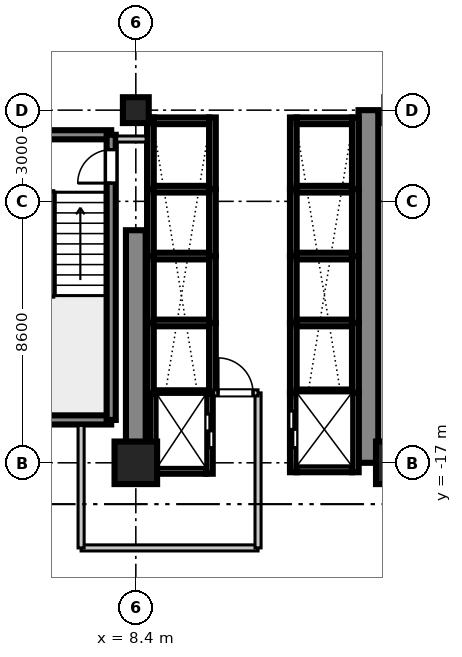
"""IFC4 building model, lengths in metres.
Left out: names, types, materials, properties, quantities, classifications, styles, units other than length and angle.
Written with IfcOpenShell. Run it as: python <this file> out.ifc"""

import sys

from ifc_helpers import new_model, si_unit, direction, frame, frame_2d, origin, origin_2d, place, context, subcontext, project, spatial, rectangle, extrude, source, transform, mapped, element, fill, save


model = new_model("IFC4")
c1 = context("Model", 3, precision=1e-05, world=origin(), true_north=direction((0.0, 1.0)))
c2 = subcontext(c1, "Body", "Model", "MODEL_VIEW")
j1 = project(units=[si_unit("LENGTHUNIT", "METRE"), si_unit("PLANEANGLEUNIT", "RADIAN")], contexts=[c1])
p1 = place(None, origin())
s1 = spatial("IfcSite", under=j1, at=p1, CompositionType="ELEMENT")
p2 = place(p1, origin())
s2 = spatial("IfcBuilding", under=s1, at=p2, CompositionType="ELEMENT")
p3 = place(p2, frame((0.0, 0.0, 39.7)))
s3 = spatial("IfcBuildingStorey", under=s2, at=p3, CompositionType="ELEMENT", Elevation=39.7)
m1 = source(origin(), c2, "Body", "SweptSolid", [
    extrude(rectangle(XDim=1.4, YDim=1.4, at=origin_2d()), origin(), (0.0, 0.0, 1.0), 3.605),
])
p4 = place(p3, frame((8.4, -17.0, 0.0), z_axis=(0.0, 0.0, 1.0), x_axis=(1.0, 0.0, 0.0)))
e1 = element("IfcColumn", 1, at=p4, inside=s3, PredefinedType="COLUMN", context=c2, shape_type="MappedRepresentation", body=[
    mapped(m1, transform((0.0, 0.0, 0.0), scale=1.0)),
])
m2 = source(origin(), c2, "Body", "SweptSolid", [
    extrude(rectangle(XDim=0.85, YDim=0.85, at=origin_2d()), origin(), (0.0, 0.0, 1.0), 3.605),
])
p5 = place(p3, frame((8.4, -5.4, 0.0), z_axis=(0.0, 0.0, 1.0), x_axis=(1.0, 0.0, 0.0)))
e2 = element("IfcColumn", 2, at=p5, inside=s3, PredefinedType="PILASTER", context=c2, shape_type="MappedRepresentation", body=[
    mapped(m2, transform((0.0, 0.0, 0.0), scale=1.0)),
])
p6 = place(p3, frame((17.0, -17.0, 0.0), z_axis=(0.0, 0.0, 1.0), x_axis=(1.0, 0.0, 0.0)))
e3 = element("IfcColumn", 3, at=p6, inside=s3, PredefinedType="COLUMN", context=c2, shape_type="MappedRepresentation", body=[
    mapped(m1, transform((0.0, 0.0, 0.0), scale=1.0)),
])
m3 = source(origin(), c2, "Body", "SweptSolid", [
    extrude(rectangle(XDim=7.65, YDim=0.65, at=frame_2d((3.825, 0.0))), origin(), (0.0, 0.0, 1.0), 3.37),
])
p7 = place(p3, frame((8.4, -17.0, 0.0), z_axis=(0.0, 0.0, 1.0), x_axis=(0.0, 1.0, 0.0)))
e4 = element("IfcWall", 4, at=p7, inside=s3, PredefinedType="SHEAR", context=c2, shape_type="MappedRepresentation", body=[
    mapped(m3, transform((0.0, 0.0, 0.0), scale=1.0)),
])
m4 = source(origin(), c2, "Body", "SweptSolid", [
    extrude(rectangle(XDim=11.6, YDim=0.65, at=frame_2d((5.8, 0.0))), origin(), (0.0, 0.0, 1.0), 3.37),
])
p8 = place(p3, frame((16.05, -17.0, 0.0), z_axis=(0.0, 0.0, 1.0), x_axis=(0.0, 1.0, 0.0)))
e5 = element("IfcWall", 5, at=p8, inside=s3, PredefinedType="SHEAR", context=c2, shape_type="MappedRepresentation", body=[
    mapped(m4, transform((0.0, 0.0, 0.0), scale=1.0)),
])
m5 = source(origin(), c2, "Body", "SweptSolid", [
    extrude(rectangle(XDim=3.98, YDim=0.3, at=frame_2d((1.99, 0.0))), origin(), (0.0, 0.0, 1.0), 3.37),
])
for number, where, z_axis, x_axis in (
    (6, (3.61, -15.59, 0.0), (0.0, 0.0, 1.0), (1.0, 0.0, 0.0)),
    (7, (3.61, -6.21, 0.0), (0.0, 0.0, 1.0), (1.0, 0.0, 0.0)),
):
    element("IfcWall", number, at=place(p3, frame(where, z_axis=z_axis, x_axis=x_axis)), inside=s3, PredefinedType="SHEAR", context=c2, shape_type="MappedRepresentation", body=[
        mapped(m5, transform((0.0, 0.0, 0.0), scale=1.0)),
    ])
m6 = source(origin(), c2, "Body", "SweptSolid", [
    extrude(rectangle(XDim=9.38, YDim=0.3, at=frame_2d((4.69, 0.0))), origin(), (0.0, 0.0, 1.0), 3.37),
])
p9 = place(p3, frame((7.59, -15.59, 0.0), z_axis=(0.0, 0.0, 1.0), x_axis=(0.0, 1.0, 0.0)))
e8 = element("IfcWall", 8, at=p9, inside=s3, PredefinedType="SHEAR", context=c2, shape_type="MappedRepresentation", body=[
    mapped(m6, transform((0.0, 0.0, 0.0), scale=1.0)),
])
p10 = place(p9, frame((7.79, 0.0, 0.0)))
e9 = element("IfcOpeningElement", 9, at=p10, cuts=e8, PredefinedType="OPENING", context=c2, shape_type="SweptSolid", body=[
    extrude(rectangle(XDim=1.1, YDim=2.15, at=frame_2d((0.55, 1.075))), frame((0.0, 0.16, 0.0), z_axis=(0.0, -1.0, 0.0), x_axis=(1.0, 0.0, 0.0)), (0.0, 0.0, 1.0), 0.32),
])
m7 = source(origin(), c2, "Body", "SweptSolid", [
    extrude(rectangle(XDim=2.36, YDim=0.22, at=frame_2d((1.18, 0.0))), origin(), (0.0, 0.0, 1.0), 3.37),
])
for number, where, z_axis, x_axis in (
    (10, (13.58, -8.0, 0.0), (0.0, 0.0, 1.0), (0.0, 1.0, 0.0)),
    (11, (15.62, -8.0, 0.0), (0.0, 0.0, 1.0), (0.0, 1.0, 0.0)),
):
    element("IfcWall", number, at=place(p3, frame(where, z_axis=z_axis, x_axis=x_axis)), inside=s3, PredefinedType="SHEAR", context=c2, shape_type="MappedRepresentation", body=[
        mapped(m7, transform((0.0, 0.0, 0.0), scale=1.0)),
    ])
m8 = source(origin(), c2, "Body", "SweptSolid", [
    extrude(rectangle(XDim=1.82, YDim=0.22, at=frame_2d((0.91, 0.0))), origin(), (0.0, 0.0, 1.0), 3.37),
])
p11 = place(p3, frame((13.69, -5.75, 0.0), z_axis=(0.0, 0.0, 1.0), x_axis=(1.0, 0.0, 0.0)))
e12 = element("IfcWall", 12, at=p11, inside=s3, PredefinedType="SHEAR", context=c2, shape_type="MappedRepresentation", body=[
    mapped(m8, transform((0.0, 0.0, 0.0), scale=1.0)),
])
m9 = source(origin(), c2, "Body", "SweptSolid", [
    extrude(rectangle(XDim=2.2, YDim=0.22, at=frame_2d((1.1, 0.0))), origin(), (0.0, 0.0, 1.0), 3.37),
])
for number, where, z_axis, x_axis in (
    (13, (13.58, -10.2, 0.0), (0.0, 0.0, 1.0), (0.0, 1.0, 0.0)),
    (14, (15.62, -10.2, 0.0), (0.0, 0.0, 1.0), (0.0, 1.0, 0.0)),
):
    element("IfcWall", number, at=place(p3, frame(where, z_axis=z_axis, x_axis=x_axis)), inside=s3, PredefinedType="SHEAR", context=c2, shape_type="MappedRepresentation", body=[
        mapped(m9, transform((0.0, 0.0, 0.0), scale=1.0)),
    ])
m10 = source(origin(), c2, "Body", "SweptSolid", [
    extrude(rectangle(XDim=1.82, YDim=0.22, at=frame_2d((0.91, 0.0))), origin(), (0.0, 0.0, 1.0), 3.65),
])
p12 = place(p3, frame((13.69, -8.0, 0.0), z_axis=(0.0, 0.0, 1.0), x_axis=(1.0, 0.0, 0.0)))
e15 = element("IfcWall", 15, at=p12, inside=s3, PredefinedType="SHEAR", context=c2, shape_type="MappedRepresentation", body=[
    mapped(m10, transform((0.0, 0.0, 0.0), scale=1.0)),
])
for number, where, z_axis, x_axis in (
    (16, (13.58, -12.4, 0.0), (0.0, 0.0, 1.0), (0.0, 1.0, 0.0)),
    (17, (15.62, -12.4, 0.0), (0.0, 0.0, 1.0), (0.0, 1.0, 0.0)),
):
    element("IfcWall", number, at=place(p3, frame(where, z_axis=z_axis, x_axis=x_axis)), inside=s3, PredefinedType="SHEAR", context=c2, shape_type="MappedRepresentation", body=[
        mapped(m9, transform((0.0, 0.0, 0.0), scale=1.0)),
    ])
p13 = place(p3, frame((13.69, -10.2, 0.0), z_axis=(0.0, 0.0, 1.0), x_axis=(1.0, 0.0, 0.0)))
e18 = element("IfcWall", 18, at=p13, inside=s3, PredefinedType="SHEAR", context=c2, shape_type="MappedRepresentation", body=[
    mapped(m10, transform((0.0, 0.0, 0.0), scale=1.0)),
])
m11 = source(origin(), c2, "Body", "SweptSolid", [
    extrude(rectangle(XDim=2.3, YDim=0.22, at=frame_2d((1.15, 0.0))), origin(), (0.0, 0.0, 1.0), 3.37),
])
for number, where, z_axis, x_axis in (
    (19, (13.58, -14.7, 0.0), (0.0, 0.0, 1.0), (0.0, 1.0, 0.0)),
    (20, (15.62, -14.7, 0.0), (0.0, 0.0, 1.0), (0.0, 1.0, 0.0)),
):
    element("IfcWall", number, at=place(p3, frame(where, z_axis=z_axis, x_axis=x_axis)), inside=s3, PredefinedType="SHEAR", context=c2, shape_type="MappedRepresentation", body=[
        mapped(m11, transform((0.0, 0.0, 0.0), scale=1.0)),
    ])
p14 = place(p3, frame((13.69, -12.4, 0.0), z_axis=(0.0, 0.0, 1.0), x_axis=(1.0, 0.0, 0.0)))
e21 = element("IfcWall", 21, at=p14, inside=s3, PredefinedType="SHEAR", context=c2, shape_type="MappedRepresentation", body=[
    mapped(m10, transform((0.0, 0.0, 0.0), scale=1.0)),
])
for number, where, z_axis, x_axis in (
    (22, (8.88, -8.0, 0.0), (0.0, 0.0, 1.0), (0.0, 1.0, 0.0)),
    (23, (10.92, -8.0, 0.0), (0.0, 0.0, 1.0), (0.0, 1.0, 0.0)),
):
    element("IfcWall", number, at=place(p3, frame(where, z_axis=z_axis, x_axis=x_axis)), inside=s3, PredefinedType="SHEAR", context=c2, shape_type="MappedRepresentation", body=[
        mapped(m7, transform((0.0, 0.0, 0.0), scale=1.0)),
    ])
p15 = place(p3, frame((8.99, -5.75, 0.0), z_axis=(0.0, 0.0, 1.0), x_axis=(1.0, 0.0, 0.0)))
e24 = element("IfcWall", 24, at=p15, inside=s3, PredefinedType="SHEAR", context=c2, shape_type="MappedRepresentation", body=[
    mapped(m8, transform((0.0, 0.0, 0.0), scale=1.0)),
])
for number, where, z_axis, x_axis in (
    (25, (8.88, -10.2, 0.0), (0.0, 0.0, 1.0), (0.0, 1.0, 0.0)),
    (26, (10.92, -10.2, 0.0), (0.0, 0.0, 1.0), (0.0, 1.0, 0.0)),
):
    element("IfcWall", number, at=place(p3, frame(where, z_axis=z_axis, x_axis=x_axis)), inside=s3, PredefinedType="SHEAR", context=c2, shape_type="MappedRepresentation", body=[
        mapped(m9, transform((0.0, 0.0, 0.0), scale=1.0)),
    ])
p16 = place(p3, frame((8.99, -8.0, 0.0), z_axis=(0.0, 0.0, 1.0), x_axis=(1.0, 0.0, 0.0)))
e27 = element("IfcWall", 27, at=p16, inside=s3, PredefinedType="SHEAR", context=c2, shape_type="MappedRepresentation", body=[
    mapped(m10, transform((0.0, 0.0, 0.0), scale=1.0)),
])
for number, where, z_axis, x_axis in (
    (28, (8.88, -12.4, 0.0), (0.0, 0.0, 1.0), (0.0, 1.0, 0.0)),
    (29, (10.92, -12.4, 0.0), (0.0, 0.0, 1.0), (0.0, 1.0, 0.0)),
):
    element("IfcWall", number, at=place(p3, frame(where, z_axis=z_axis, x_axis=x_axis)), inside=s3, PredefinedType="SHEAR", context=c2, shape_type="MappedRepresentation", body=[
        mapped(m9, transform((0.0, 0.0, 0.0), scale=1.0)),
    ])
p17 = place(p3, frame((8.99, -10.2, 0.0), z_axis=(0.0, 0.0, 1.0), x_axis=(1.0, 0.0, 0.0)))
e30 = element("IfcWall", 30, at=p17, inside=s3, PredefinedType="SHEAR", context=c2, shape_type="MappedRepresentation", body=[
    mapped(m10, transform((0.0, 0.0, 0.0), scale=1.0)),
])
m12 = source(origin(), c2, "Body", "SweptSolid", [
    extrude(rectangle(XDim=2.325, YDim=0.22, at=frame_2d((1.163, 0.0))), origin(), (0.0, 0.0, 1.0), 3.37),
])
for number, where, z_axis, x_axis in (
    (31, (8.88, -14.725, 0.0), (0.0, 0.0, 1.0), (0.0, 1.0, 0.0)),
    (32, (10.92, -14.725, 0.0), (0.0, 0.0, 1.0), (0.0, 1.0, 0.0)),
):
    element("IfcWall", number, at=place(p3, frame(where, z_axis=z_axis, x_axis=x_axis)), inside=s3, PredefinedType="SHEAR", context=c2, shape_type="MappedRepresentation", body=[
        mapped(m12, transform((0.0, 0.0, 0.0), scale=1.0)),
    ])
p18 = place(p3, frame((8.99, -12.4, 0.0), z_axis=(0.0, 0.0, 1.0), x_axis=(1.0, 0.0, 0.0)))
e33 = element("IfcWall", 33, at=p18, inside=s3, PredefinedType="SHEAR", context=c2, shape_type="MappedRepresentation", body=[
    mapped(m10, transform((0.0, 0.0, 0.0), scale=1.0)),
])
m13 = source(origin(), c2, "Body", "SweptSolid", [
    extrude(rectangle(XDim=2.635, YDim=0.22, at=frame_2d((1.317, 0.0))), origin(), (0.0, 0.0, 1.0), 3.37),
])
p19 = place(p3, frame((8.98, -17.36, 0.0), z_axis=(0.0, 0.0, 1.0), x_axis=(0.0, 1.0, 0.0)))
e34 = element("IfcWall", 34, at=p19, inside=s3, PredefinedType="SHEAR", context=c2, shape_type="MappedRepresentation", body=[
    mapped(m13, transform((0.0, 0.0, 0.0), scale=1.0)),
])
p20 = place(p3, frame((10.82, -17.36, 0.0), z_axis=(0.0, 0.0, 1.0), x_axis=(0.0, 1.0, 0.0)))
e35 = element("IfcWall", 35, at=p20, inside=s3, PredefinedType="SHEAR", context=c2, shape_type="MappedRepresentation", body=[
    mapped(m13, transform((0.0, 0.0, 0.0), scale=1.0)),
])
p21 = place(p20, frame((0.86, 0.0, 0.0)))
e36 = element("IfcOpeningElement", 36, at=p21, cuts=e35, PredefinedType="OPENING", context=c2, shape_type="SweptSolid", body=[
    extrude(rectangle(XDim=1.1, YDim=2.2, at=frame_2d((0.55, 1.1))), frame((0.0, 0.12, 0.0), z_axis=(0.0, -1.0, 0.0), x_axis=(1.0, 0.0, 0.0)), (0.0, 0.0, 1.0), 0.24),
])
m14 = source(origin(), c2, "Body", "SweptSolid", [
    extrude(rectangle(XDim=1.62, YDim=0.22, at=frame_2d((0.81, 0.0))), origin(), (0.0, 0.0, 1.0), 3.37),
])
p22 = place(p3, frame((9.09, -17.25, 0.0), z_axis=(0.0, 0.0, 1.0), x_axis=(1.0, 0.0, 0.0)))
e37 = element("IfcWall", 37, at=p22, inside=s3, PredefinedType="SHEAR", context=c2, shape_type="MappedRepresentation", body=[
    mapped(m14, transform((0.0, 0.0, 0.0), scale=1.0)),
])
m15 = source(origin(), c2, "Body", "SweptSolid", [
    extrude(rectangle(XDim=1.62, YDim=0.22, at=frame_2d((0.81, 0.0))), origin(), (0.0, 0.0, 1.0), 3.65),
])
p23 = place(p3, frame((9.09, -14.725, 0.0), z_axis=(0.0, 0.0, 1.0), x_axis=(1.0, 0.0, 0.0)))
e38 = element("IfcWall", 38, at=p23, inside=s3, PredefinedType="SHEAR", context=c2, shape_type="MappedRepresentation", body=[
    mapped(m15, transform((0.0, 0.0, 0.0), scale=1.0)),
])
m16 = source(origin(), c2, "Body", "SweptSolid", [
    extrude(rectangle(XDim=2.61, YDim=0.22, at=frame_2d((1.305, 0.0))), origin(), (0.0, 0.0, 1.0), 3.37),
])
p24 = place(p3, frame((13.58, -17.31, 0.0), z_axis=(0.0, 0.0, 1.0), x_axis=(0.0, 1.0, 0.0)))
e39 = element("IfcWall", 39, at=p24, inside=s3, PredefinedType="SHEAR", context=c2, shape_type="MappedRepresentation", body=[
    mapped(m16, transform((0.0, 0.0, 0.0), scale=1.0)),
])
p25 = place(p24, frame((0.81, 0.0, 0.0)))
e40 = element("IfcOpeningElement", 40, at=p25, cuts=e39, PredefinedType="OPENING", context=c2, shape_type="SweptSolid", body=[
    extrude(rectangle(XDim=1.2, YDim=2.2, at=frame_2d((0.6, 1.1))), frame((0.0, 0.12, 0.0), z_axis=(0.0, -1.0, 0.0), x_axis=(1.0, 0.0, 0.0)), (0.0, 0.0, 1.0), 0.24),
])
p26 = place(p3, frame((15.62, -17.31, 0.0), z_axis=(0.0, 0.0, 1.0), x_axis=(0.0, 1.0, 0.0)))
e41 = element("IfcWall", 41, at=p26, inside=s3, PredefinedType="SHEAR", context=c2, shape_type="MappedRepresentation", body=[
    mapped(m16, transform((0.0, 0.0, 0.0), scale=1.0)),
])
p27 = place(p3, frame((13.69, -17.2, 0.0), z_axis=(0.0, 0.0, 1.0), x_axis=(1.0, 0.0, 0.0)))
e42 = element("IfcWall", 42, at=p27, inside=s3, PredefinedType="SHEAR", context=c2, shape_type="MappedRepresentation", body=[
    mapped(m8, transform((0.0, 0.0, 0.0), scale=1.0)),
])
p28 = place(p3, frame((13.69, -14.7, 0.0), z_axis=(0.0, 0.0, 1.0), x_axis=(1.0, 0.0, 0.0)))
e43 = element("IfcWall", 43, at=p28, inside=s3, PredefinedType="SHEAR", context=c2, shape_type="MappedRepresentation", body=[
    mapped(m10, transform((0.0, 0.0, 0.0), scale=1.0)),
])
m17 = source(origin(), c2, "Body", "SweptSolid", [
    extrude(rectangle(XDim=5.82, YDim=0.2, at=frame_2d((2.91, 0.0))), origin(), (0.0, 0.0, 1.0), 2.71),
])
p29 = place(p3, frame((6.6, -19.8, 0.0), z_axis=(0.0, 0.0, 1.0), x_axis=(1.0, 0.0, 0.0)))
e44 = element("IfcWall", 44, at=p29, inside=s3, PredefinedType="PARTITIONING", context=c2, shape_type="MappedRepresentation", body=[
    mapped(m17, transform((0.0, 0.0, 0.0), scale=1.0)),
])
m18 = source(origin(), c2, "Body", "SweptSolid", [
    extrude(rectangle(XDim=4.03, YDim=0.2, at=frame_2d((2.015, 0.0))), origin(), (0.0, 0.0, 1.0), 2.71),
])
p30 = place(p3, frame((6.6, -19.8, 0.0), z_axis=(0.0, 0.0, 1.0), x_axis=(0.0, 1.0, 0.0)))
e45 = element("IfcWall", 45, at=p30, inside=s3, PredefinedType="PARTITIONING", context=c2, shape_type="MappedRepresentation", body=[
    mapped(m18, transform((0.0, 0.0, 0.0), scale=1.0)),
])
m19 = source(origin(), c2, "Body", "SweptSolid", [
    extrude(rectangle(XDim=5.1, YDim=0.2, at=frame_2d((2.55, 0.0))), origin(), (0.0, 0.0, 1.0), 2.71),
])
p31 = place(p3, frame((12.42, -19.8, 0.0), z_axis=(0.0, 0.0, 1.0), x_axis=(0.0, 1.0, 0.0)))
e46 = element("IfcWall", 46, at=p31, inside=s3, PredefinedType="PARTITIONING", context=c2, shape_type="MappedRepresentation", body=[
    mapped(m19, transform((0.0, 0.0, 0.0), scale=1.0)),
])
m20 = source(origin(), c2, "Body", "SweptSolid", [
    extrude(rectangle(XDim=1.46, YDim=0.2, at=frame_2d((0.73, 0.0))), origin(), (0.0, 0.0, 1.0), 2.71),
])
p32 = place(p3, frame((10.96, -14.7, 0.0), z_axis=(0.0, 0.0, 1.0), x_axis=(1.0, 0.0, 0.0)))
e47 = element("IfcWall", 47, at=p32, inside=s3, PredefinedType="PARTITIONING", context=c2, shape_type="MappedRepresentation", body=[
    mapped(m20, transform((0.0, 0.0, 0.0), scale=1.0)),
])
p33 = place(p32, frame((0.145, 0.0, 0.0)))
e48 = element("IfcOpeningElement", 48, at=p33, cuts=e47, PredefinedType="OPENING", context=c2, shape_type="SweptSolid", body=[
    extrude(rectangle(XDim=1.15, YDim=2.15, at=frame_2d((0.575, 1.075))), frame((0.0, 0.11, 0.0), z_axis=(0.0, -1.0, 0.0), x_axis=(1.0, 0.0, 0.0)), (0.0, 0.0, 1.0), 0.22),
])
m21 = source(origin(), c2, "Body", "SweptSolid", [
    extrude(rectangle(XDim=0.97, YDim=0.2, at=frame_2d((0.485, 0.0))), origin(), (0.0, 0.0, 1.0), 2.71),
])
p34 = place(p3, frame((7.77, -6.35, 0.0), z_axis=(0.0, 0.0, 1.0), x_axis=(1.0, 0.0, 0.0)))
e49 = element("IfcWall", 49, at=p34, inside=s3, PredefinedType="PARTITIONING", context=c2, shape_type="MappedRepresentation", body=[
    mapped(m21, transform((0.0, 0.0, 0.0), scale=1.0)),
])
m22 = source(origin(), c2, "Body", "SweptSolid", [
    extrude(rectangle(XDim=1.1, YDim=2.15, at=frame_2d((0.55, 1.075))), frame((0.0, 0.025, 0.0), z_axis=(0.0, -1.0, 0.0), x_axis=(1.0, 0.0, 0.0)), (0.0, 0.0, 1.0), 0.05),
])
p35 = place(p10, origin())
e50 = element("IfcDoor", 50, at=p35, inside=s3, OperationType="SINGLE_SWING_LEFT", PredefinedType="DOOR", context=c2, shape_type="MappedRepresentation", body=[
    mapped(m22, transform((0.0, 0.0, 0.0), scale=1.0)),
])
fill(e9, e50)
m23 = source(origin(), c2, "Body", "SweptSolid", [
    extrude(rectangle(XDim=1.1, YDim=2.2, at=frame_2d((0.55, 1.1))), frame((0.0, 0.025, 0.0), z_axis=(0.0, -1.0, 0.0), x_axis=(1.0, 0.0, 0.0)), (0.0, 0.0, 1.0), 0.05),
])
p36 = place(p21, frame((1.1, 0.0, 0.0), z_axis=(0.0, 0.0, 1.0), x_axis=(-1.0, 0.0, 0.0)))
e51 = element("IfcDoor", 51, at=p36, inside=s3, OperationType="DOUBLE_DOOR_SLIDING", PredefinedType="DOOR", context=c2, shape_type="MappedRepresentation", body=[
    mapped(m23, transform((0.0, 0.0, 0.0), scale=1.0)),
])
fill(e36, e51)
m24 = source(origin(), c2, "Body", "SweptSolid", [
    extrude(rectangle(XDim=1.2, YDim=2.2, at=frame_2d((0.6, 1.1))), frame((0.0, 0.025, 0.0), z_axis=(0.0, -1.0, 0.0), x_axis=(1.0, 0.0, 0.0)), (0.0, 0.0, 1.0), 0.05),
])
p37 = place(p25, origin())
e52 = element("IfcDoor", 52, at=p37, inside=s3, OperationType="DOUBLE_DOOR_SLIDING", PredefinedType="DOOR", context=c2, shape_type="MappedRepresentation", body=[
    mapped(m24, transform((0.0, 0.0, 0.0), scale=1.0)),
])
fill(e40, e52)
m25 = source(origin(), c2, "Body", "SweptSolid", [
    extrude(rectangle(XDim=1.15, YDim=2.15, at=frame_2d((0.575, 1.075))), frame((0.0, 0.025, 0.0), z_axis=(0.0, -1.0, 0.0), x_axis=(1.0, 0.0, 0.0)), (0.0, 0.0, 1.0), 0.05),
])
p38 = place(p33, origin())
e53 = element("IfcDoor", 53, at=p38, inside=s3, OperationType="SINGLE_SWING_LEFT", PredefinedType="DOOR", context=c2, shape_type="MappedRepresentation", body=[
    mapped(m25, transform((0.0, 0.0, 0.0), scale=1.0)),
])
fill(e48, e53)
save(model, sys.argv[1])
